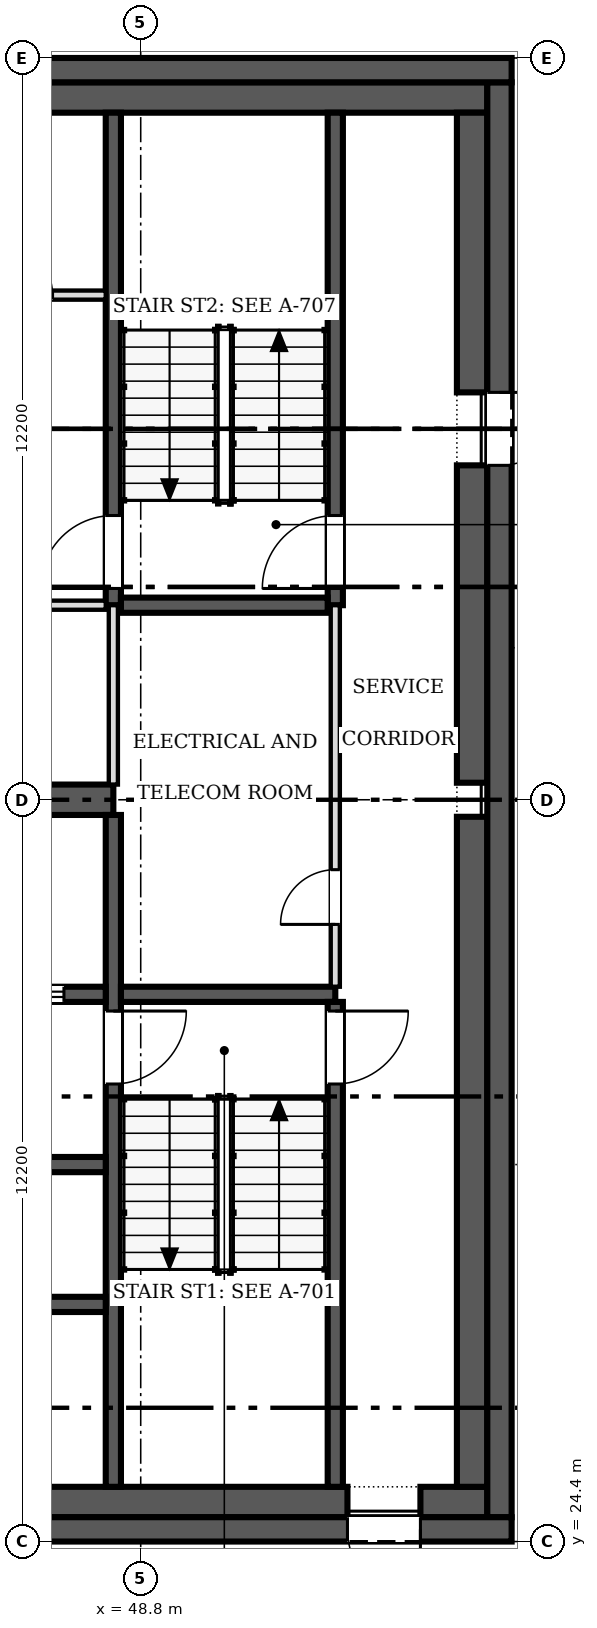
"""IFC4 building model, lengths in metres.
Left out: names, types, materials, properties, quantities, classifications, styles, units other than length and angle.
Written with IfcOpenShell. Run it as: python <this file> out.ifc"""

import sys

from ifc_helpers import new_model, si_unit, direction, frame, frame_2d, origin, place, context, subcontext, project, spatial, rectangle, extrude, source, transform, mapped, element, fill, save


model = new_model("IFC4")
c1 = context("Model", 3, precision=1e-05, world=origin(), true_north=direction((0.0, 1.0)))
c2 = subcontext(c1, "Body", "Model", "MODEL_VIEW")
j1 = project(units=[si_unit("LENGTHUNIT", "METRE"), si_unit("PLANEANGLEUNIT", "RADIAN")], contexts=[c1])
p1 = place(None, origin())
s1 = spatial("IfcSite", under=j1, at=p1, CompositionType="ELEMENT")
p2 = place(p1, origin())
s2 = spatial("IfcBuilding", under=s1, at=p2, CompositionType="ELEMENT")
p3 = place(p2, frame((0.0, 0.0, 236.9)))
s3 = spatial("IfcBuildingStorey", under=s2, at=p3, CompositionType="ELEMENT", Elevation=236.9)
p4 = place(p3, frame((54.9, 24.6, 0.0), z_axis=(0.0, 0.0, 1.0), x_axis=(-1.0, 0.0, 0.0)))
e1 = element("IfcWall", 1, at=p4, inside=s3, PredefinedType="SHEAR", context=c2, shape_type="SweptSolid", body=[
    extrude(rectangle(XDim=24.4, YDim=0.4, at=frame_2d((12.2, 0.0))), origin(), (0.0, 0.0, 1.0), 3.8),
])
m1 = source(origin(), c2, "Body", "SweptSolid", [
    extrude(rectangle(XDim=1.2, YDim=2.1, at=frame_2d((0.6, 1.05))), frame((0.0, 0.21, 0.0), z_axis=(0.0, -1.0, 0.0), x_axis=(1.0, 0.0, 0.0)), (0.0, 0.0, 1.0), 0.42),
])
p5 = place(p4, frame((1.5, 0.0, 0.0)))
e2 = element("IfcOpeningElement", 2, at=p5, cuts=e1, PredefinedType="OPENING", context=c2, shape_type="MappedRepresentation", body=[
    mapped(m1, transform((0.0, 0.0, 0.0), scale=1.0)),
])
p6 = place(p3, frame((30.5, 48.6, 0.0), z_axis=(0.0, 0.0, 1.0), x_axis=(1.0, 0.0, 0.0)))
e3 = element("IfcWall", 3, at=p6, inside=s3, PredefinedType="SHEAR", context=c2, shape_type="SweptSolid", body=[
    extrude(rectangle(XDim=24.4, YDim=0.4, at=frame_2d((12.2, 0.0))), origin(), (0.0, 0.0, 1.0), 3.8),
])
p7 = place(p3, frame((54.7, 48.4, 0.0), z_axis=(0.0, 0.0, 1.0), x_axis=(0.0, -1.0, 0.0)))
e4 = element("IfcWall", 4, at=p7, inside=s3, PredefinedType="SHEAR", context=c2, shape_type="SweptSolid", body=[
    extrude(rectangle(XDim=23.6, YDim=0.4, at=frame_2d((11.8, 0.0))), origin(), (0.0, 0.0, 1.0), 3.8),
])
p8 = place(p7, frame((5.1, 0.0, 0.0)))
e5 = element("IfcOpeningElement", 5, at=p8, cuts=e4, PredefinedType="OPENING", context=c2, shape_type="MappedRepresentation", body=[
    mapped(m1, transform((0.0, 0.0, 0.0), scale=1.0)),
])
p9 = place(p3, frame((30.9, 25.05, 0.0), z_axis=(0.0, 0.0, 1.0), x_axis=(1.0, 0.0, 0.0)))
e6 = element("IfcWall", 6, at=p9, inside=s3, PredefinedType="SOLIDWALL", context=c2, shape_type="SweptSolid", body=[
    extrude(rectangle(XDim=21.3, YDim=0.5, at=frame_2d((10.65, 0.0))), origin(), (0.0, 0.0, 1.0), 3.8),
])
p10 = place(p3, frame((53.4, 25.05, 0.0), z_axis=(0.0, 0.0, 1.0), x_axis=(1.0, 0.0, 0.0)))
e7 = element("IfcWall", 7, at=p10, inside=s3, PredefinedType="SOLIDWALL", context=c2, shape_type="SweptSolid", body=[
    extrude(rectangle(XDim=1.1, YDim=0.5, at=frame_2d((0.55, 0.0))), origin(), (0.0, 0.0, 1.0), 3.8),
])
p11 = place(p3, frame((30.9, 48.15, 0.0), z_axis=(0.0, 0.0, 1.0), x_axis=(1.0, 0.0, 0.0)))
e8 = element("IfcWall", 8, at=p11, inside=s3, PredefinedType="SOLIDWALL", context=c2, shape_type="SweptSolid", body=[
    extrude(rectangle(XDim=23.6, YDim=0.5, at=frame_2d((11.8, 0.0))), origin(), (0.0, 0.0, 1.0), 3.8),
])
p12 = place(p3, frame((54.25, 25.3, 0.0), z_axis=(0.0, 0.0, 1.0), x_axis=(0.0, 1.0, 0.0)))
e9 = element("IfcWall", 9, at=p12, inside=s3, PredefinedType="SOLIDWALL", context=c2, shape_type="SweptSolid", body=[
    extrude(rectangle(XDim=11.02, YDim=0.5, at=frame_2d((5.51, 0.0))), origin(), (0.0, 0.0, 1.0), 3.8),
])
p13 = place(p3, frame((54.25, 36.88, 0.0), z_axis=(0.0, 0.0, 1.0), x_axis=(0.0, 1.0, 0.0)))
e10 = element("IfcWall", 10, at=p13, inside=s3, PredefinedType="SOLIDWALL", context=c2, shape_type="SweptSolid", body=[
    extrude(rectangle(XDim=5.22, YDim=0.5, at=frame_2d((2.61, 0.0))), origin(), (0.0, 0.0, 1.0), 3.8),
])
p14 = place(p3, frame((54.25, 43.3, 0.0), z_axis=(0.0, 0.0, 1.0), x_axis=(0.0, 1.0, 0.0)))
e11 = element("IfcWall", 11, at=p14, inside=s3, PredefinedType="SOLIDWALL", context=c2, shape_type="SweptSolid", body=[
    extrude(rectangle(XDim=4.6, YDim=0.5, at=frame_2d((2.3, 0.0))), origin(), (0.0, 0.0, 1.0), 3.8),
])
p15 = place(p3, frame((31.4, 36.6, 0.0), z_axis=(0.0, 0.0, 1.0), x_axis=(1.0, 0.0, 0.0)))
e12 = element("IfcWall", 12, at=p15, inside=s3, PredefinedType="SHEAR", context=c2, shape_type="SweptSolid", body=[
    extrude(rectangle(XDim=16.95, YDim=0.5, at=frame_2d((8.475, 0.0))), origin(), (0.0, 0.0, 1.0), 3.8),
])
p16 = place(p3, frame((48.35, 36.35, 0.0), z_axis=(0.0, 0.0, 1.0), x_axis=(0.0, -1.0, 0.0)))
e13 = element("IfcWall", 13, at=p16, inside=s3, PredefinedType="SOLIDWALL", context=c2, shape_type="SweptSolid", body=[
    extrude(rectangle(XDim=11.05, YDim=0.25, at=frame_2d((5.525, 0.0))), origin(), (0.0, 0.0, 1.0), 3.8),
])
m2 = source(origin(), c2, "Body", "SweptSolid", [
    extrude(rectangle(XDim=1.2, YDim=2.1, at=frame_2d((0.6, 1.05))), frame((0.0, 0.135, 0.0), z_axis=(0.0, -1.0, 0.0), x_axis=(1.0, 0.0, 0.0)), (0.0, 0.0, 1.0), 0.27),
])
p17 = place(p16, frame((3.225, 0.0, 0.0)))
e14 = element("IfcOpeningElement", 14, at=p17, cuts=e13, PredefinedType="OPENING", context=c2, shape_type="MappedRepresentation", body=[
    mapped(m2, transform((0.0, 0.0, 0.0), scale=1.0)),
])
p18 = place(p3, frame((48.225, 33.4, 0.0), z_axis=(0.0, 0.0, 1.0), x_axis=(-1.0, 0.0, 0.0)))
e15 = element("IfcWall", 15, at=p18, inside=s3, PredefinedType="SOLIDWALL", context=c2, shape_type="SweptSolid", body=[
    extrude(rectangle(XDim=5.275, YDim=0.25, at=frame_2d((2.638, 0.0))), origin(), (0.0, 0.0, 1.0), 3.8),
])
p19 = place(p18, frame((3.512, 0.0, 0.0)))
e16 = element("IfcOpeningElement", 16, at=p19, cuts=e15, PredefinedType="OPENING", context=c2, shape_type="MappedRepresentation", body=[
    mapped(m2, transform((0.0, 0.0, 0.0), scale=1.0)),
])
p20 = place(p18, frame((0.688, 0.0, 0.0)))
e17 = element("IfcOpeningElement", 17, at=p20, cuts=e15, PredefinedType="OPENING", context=c2, shape_type="MappedRepresentation", body=[
    mapped(m2, transform((0.0, 0.0, 0.0), scale=1.0)),
])
p21 = place(p3, frame((48.475, 33.4, 0.0), z_axis=(0.0, 0.0, 1.0), x_axis=(1.0, 0.0, 0.0)))
e18 = element("IfcWall", 18, at=p21, inside=s3, PredefinedType="SOLIDWALL", context=c2, shape_type="SweptSolid", body=[
    extrude(rectangle(XDim=3.525, YDim=0.25, at=frame_2d((1.762, 0.0))), origin(), (0.0, 0.0, 1.0), 3.8),
])
p22 = place(p3, frame((48.35, 47.9, 0.0), z_axis=(0.0, 0.0, 1.0), x_axis=(0.0, -1.0, 0.0)))
e19 = element("IfcWall", 19, at=p22, inside=s3, PredefinedType="SOLIDWALL", context=c2, shape_type="SweptSolid", body=[
    extrude(rectangle(XDim=8.1, YDim=0.25, at=frame_2d((4.05, 0.0))), origin(), (0.0, 0.0, 1.0), 3.8),
])
p23 = place(p22, frame((6.625, 0.0, 0.0)))
e20 = element("IfcOpeningElement", 20, at=p23, cuts=e19, PredefinedType="OPENING", context=c2, shape_type="MappedRepresentation", body=[
    mapped(m2, transform((0.0, 0.0, 0.0), scale=1.0)),
])
p24 = place(p3, frame((52.0, 25.3, 0.0), z_axis=(0.0, 0.0, 1.0), x_axis=(0.0, 1.0, 0.0)))
e21 = element("IfcWall", 21, at=p24, inside=s3, PredefinedType="SOLIDWALL", context=c2, shape_type="SweptSolid", body=[
    extrude(rectangle(XDim=7.975, YDim=0.25, at=frame_2d((3.987, 0.0))), origin(), (0.0, 0.0, 1.0), 3.8),
])
p25 = place(p24, frame((6.625, 0.0, 0.0)))
e22 = element("IfcOpeningElement", 22, at=p25, cuts=e21, PredefinedType="OPENING", context=c2, shape_type="MappedRepresentation", body=[
    mapped(m2, transform((0.0, 0.0, 0.0), scale=1.0)),
])
p26 = place(p3, frame((52.0, 39.8, 0.0), z_axis=(0.0, 0.0, 1.0), x_axis=(0.0, 1.0, 0.0)))
e23 = element("IfcWall", 23, at=p26, inside=s3, PredefinedType="SOLIDWALL", context=c2, shape_type="SweptSolid", body=[
    extrude(rectangle(XDim=8.1, YDim=0.25, at=frame_2d((4.05, 0.0))), origin(), (0.0, 0.0, 1.0), 3.8),
])
p27 = place(p26, frame((0.275, 0.0, 0.0)))
e24 = element("IfcOpeningElement", 24, at=p27, cuts=e23, PredefinedType="OPENING", context=c2, shape_type="MappedRepresentation", body=[
    mapped(m2, transform((0.0, 0.0, 0.0), scale=1.0)),
])
for number, where, z_axis, x_axis in (
    (25, (42.95, 28.3, 0.0), (0.0, 0.0, 1.0), (1.0, 0.0, 0.0)),
    (26, (42.95, 30.6, 0.0), (0.0, 0.0, 1.0), (1.0, 0.0, 0.0)),
):
    element("IfcWall", number, at=place(p3, frame(where, z_axis=z_axis, x_axis=x_axis)), inside=s3, PredefinedType="SOLIDWALL", context=c2, shape_type="SweptSolid", body=[
        extrude(rectangle(XDim=5.275, YDim=0.25, at=frame_2d((2.638, 0.0))), origin(), (0.0, 0.0, 1.0), 3.8),
    ])
p28 = place(p3, frame((48.475, 39.8, 0.0), z_axis=(0.0, 0.0, 1.0), x_axis=(1.0, 0.0, 0.0)))
e27 = element("IfcWall", 27, at=p28, inside=s3, PredefinedType="SOLIDWALL", context=c2, shape_type="SweptSolid", body=[
    extrude(rectangle(XDim=3.4, YDim=0.25, at=frame_2d((1.7, 0.0))), origin(), (0.0, 0.0, 1.0), 3.8),
])
p29 = place(p3, frame((52.0, 33.525, 0.0), z_axis=(0.0, 0.0, 1.0), x_axis=(0.0, 1.0, 0.0)))
e28 = element("IfcWall", 28, at=p29, inside=s3, PredefinedType="PARTITIONING", context=c2, shape_type="SweptSolid", body=[
    extrude(rectangle(XDim=6.275, YDim=0.15, at=frame_2d((3.138, 0.0))), origin(), (0.0, 0.0, 1.0), 3.6),
])
m3 = source(origin(), c2, "Body", "SweptSolid", [
    extrude(rectangle(XDim=0.9, YDim=2.1, at=frame_2d((0.45, 1.05))), frame((0.0, 0.085, 0.0), z_axis=(0.0, -1.0, 0.0), x_axis=(1.0, 0.0, 0.0)), (0.0, 0.0, 1.0), 0.17),
])
p30 = place(p29, frame((1.025, 0.0, 0.0)))
e29 = element("IfcOpeningElement", 29, at=p30, cuts=e28, PredefinedType="OPENING", context=c2, shape_type="MappedRepresentation", body=[
    mapped(m3, transform((0.0, 0.0, 0.0), scale=1.0)),
])
p31 = place(p3, frame((48.225, 39.8, 0.0), z_axis=(0.0, 0.0, 1.0), x_axis=(-1.0, 0.0, 0.0)))
e30 = element("IfcWall", 30, at=p31, inside=s3, PredefinedType="PARTITIONING", context=c2, shape_type="SweptSolid", body=[
    extrude(rectangle(XDim=5.275, YDim=0.15, at=frame_2d((2.638, 0.0))), origin(), (0.0, 0.0, 1.0), 3.6),
])
p32 = place(p31, frame((2.25, 0.0, 0.0)))
e31 = element("IfcOpeningElement", 31, at=p32, cuts=e30, PredefinedType="OPENING", context=c2, shape_type="MappedRepresentation", body=[
    mapped(m3, transform((0.0, 0.0, 0.0), scale=1.0)),
])
p33 = place(p3, frame((48.35, 36.85, 0.0), z_axis=(0.0, 0.0, 1.0), x_axis=(0.0, 1.0, 0.0)))
e32 = element("IfcWall", 32, at=p33, inside=s3, PredefinedType="PARTITIONING", context=c2, shape_type="SweptSolid", body=[
    extrude(rectangle(XDim=2.95, YDim=0.15, at=frame_2d((1.475, 0.0))), origin(), (0.0, 0.0, 1.0), 3.6),
])
p34 = place(p3, frame((45.6, 44.9, 0.0), z_axis=(0.0, 0.0, 1.0), x_axis=(1.0, 0.0, 0.0)))
e33 = element("IfcWall", 33, at=p34, inside=s3, PredefinedType="PARTITIONING", context=c2, shape_type="SweptSolid", body=[
    extrude(rectangle(XDim=2.625, YDim=0.15, at=frame_2d((1.312, 0.0))), origin(), (0.0, 0.0, 1.0), 3.6),
])
p35 = place(p34, frame((0.85, 0.0, 0.0)))
e34 = element("IfcOpeningElement", 34, at=p35, cuts=e33, PredefinedType="OPENING", context=c2, shape_type="MappedRepresentation", body=[
    mapped(m3, transform((0.0, 0.0, 0.0), scale=1.0)),
])
m4 = source(origin(), c2, "Body", "SweptSolid", [
    extrude(rectangle(XDim=1.2, YDim=2.1, at=frame_2d((0.6, 1.05))), frame((0.0, 0.025, 0.0), z_axis=(0.0, -1.0, 0.0), x_axis=(1.0, 0.0, 0.0)), (0.0, 0.0, 1.0), 0.05),
])
p36 = place(p5, origin())
e35 = element("IfcDoor", 35, at=p36, inside=s3, OperationType="SINGLE_SWING_LEFT", PredefinedType="DOOR", context=c2, shape_type="MappedRepresentation", body=[
    mapped(m4, transform((0.0, 0.0, 0.0), scale=1.0)),
])
fill(e2, e35)
p37 = place(p8, origin())
e36 = element("IfcDoor", 36, at=p37, inside=s3, OperationType="SINGLE_SWING_LEFT", PredefinedType="DOOR", context=c2, shape_type="MappedRepresentation", body=[
    mapped(m4, transform((0.0, 0.0, 0.0), scale=1.0)),
])
fill(e5, e36)
p38 = place(p17, origin())
e37 = element("IfcDoor", 37, at=p38, inside=s3, OperationType="SINGLE_SWING_LEFT", PredefinedType="DOOR", context=c2, shape_type="MappedRepresentation", body=[
    mapped(m4, transform((0.0, 0.0, 0.0), scale=1.0)),
])
fill(e14, e37)
p39 = place(p20, origin())
e38 = element("IfcDoor", 38, at=p39, inside=s3, OperationType="DOUBLE_DOOR_SLIDING", PredefinedType="DOOR", context=c2, shape_type="MappedRepresentation", body=[
    mapped(m4, transform((0.0, 0.0, 0.0), scale=1.0)),
])
fill(e17, e38)
p40 = place(p23, origin())
e39 = element("IfcDoor", 39, at=p40, inside=s3, OperationType="SINGLE_SWING_RIGHT", PredefinedType="DOOR", context=c2, shape_type="MappedRepresentation", body=[
    mapped(m4, transform((0.0, 0.0, 0.0), scale=1.0)),
])
fill(e20, e39)
p41 = place(p25, origin())
e40 = element("IfcDoor", 40, at=p41, inside=s3, OperationType="SINGLE_SWING_RIGHT", PredefinedType="DOOR", context=c2, shape_type="MappedRepresentation", body=[
    mapped(m4, transform((0.0, 0.0, 0.0), scale=1.0)),
])
fill(e22, e40)
p42 = place(p27, origin())
e41 = element("IfcDoor", 41, at=p42, inside=s3, OperationType="SINGLE_SWING_LEFT", PredefinedType="DOOR", context=c2, shape_type="MappedRepresentation", body=[
    mapped(m4, transform((0.0, 0.0, 0.0), scale=1.0)),
])
fill(e24, e41)
m5 = source(origin(), c2, "Body", "SweptSolid", [
    extrude(rectangle(XDim=0.9, YDim=2.1, at=frame_2d((0.45, 1.05))), frame((0.0, 0.025, 0.0), z_axis=(0.0, -1.0, 0.0), x_axis=(1.0, 0.0, 0.0)), (0.0, 0.0, 1.0), 0.05),
])
p43 = place(p30, origin())
e42 = element("IfcDoor", 42, at=p43, inside=s3, OperationType="SINGLE_SWING_LEFT", PredefinedType="DOOR", context=c2, shape_type="MappedRepresentation", body=[
    mapped(m5, transform((0.0, 0.0, 0.0), scale=1.0)),
])
fill(e29, e42)
save(model, sys.argv[1])
